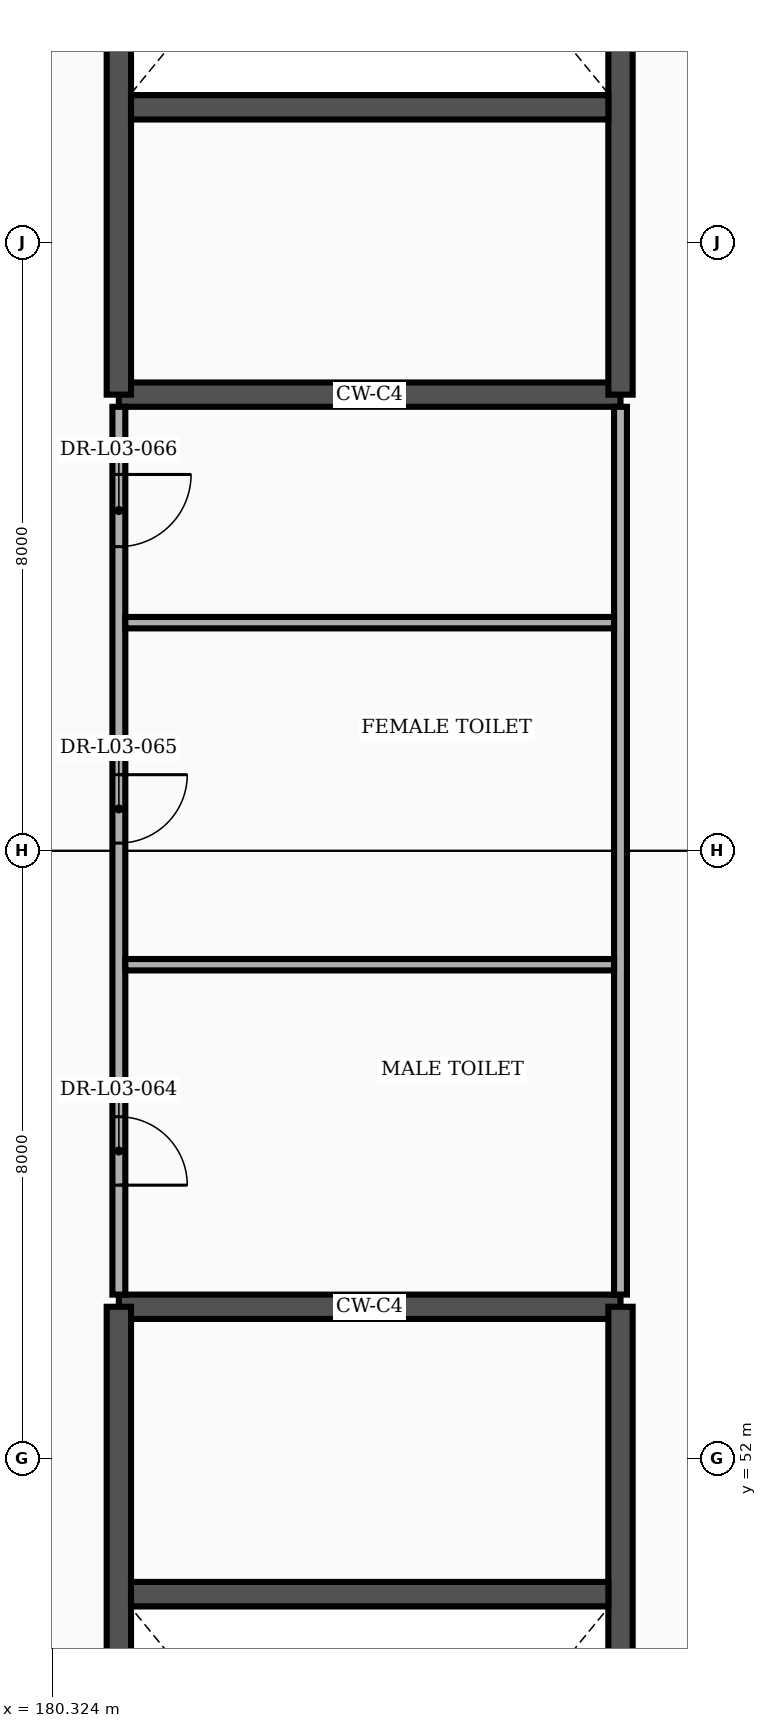
"""IFC4 building model, lengths in metres.
Left out: names, types, materials, properties, quantities, classifications, styles, units other than length and angle.
Written with IfcOpenShell. Run it as: python <this file> out.ifc"""

import sys

from ifc_helpers import new_model, si_unit, direction, frame, frame_2d, origin, place, context, subcontext, project, spatial, rectangle, extrude, element, fill, save


model = new_model("IFC4")
c1 = context("Model", 3, precision=1e-05, world=origin(), true_north=direction((0.0, 1.0)))
c2 = subcontext(c1, "Body", "Model", "MODEL_VIEW")
j1 = project(units=[si_unit("LENGTHUNIT", "METRE"), si_unit("PLANEANGLEUNIT", "RADIAN")], contexts=[c1])
p1 = place(None, origin())
s1 = spatial("IfcSite", under=j1, at=p1, CompositionType="ELEMENT")
p2 = place(p1, origin())
s2 = spatial("IfcBuilding", under=s1, at=p2, CompositionType="ELEMENT")
p3 = place(p2, frame((0.0, 0.0, 16.8)))
s3 = spatial("IfcBuildingStorey", under=s2, at=p3, CompositionType="ELEMENT", Elevation=16.8)
p4 = place(p3, frame((181.2, 54.0, 0.0), z_axis=(0.0, 0.0, 1.0), x_axis=(1.0, 0.0, 0.0)))
e1 = element("IfcWall", 1, at=p4, inside=s3, PredefinedType="SHEAR", context=c2, shape_type="SweptSolid", body=[
    extrude(rectangle(XDim=6.6, YDim=0.32, at=frame_2d((3.3, 0.0))), origin(), (0.0, 0.0, 1.0), 4.555),
])
p5 = place(p3, frame((181.2, 39.4, 0.0), z_axis=(0.0, 0.0, 1.0), x_axis=(0.0, 1.0, 0.0)))
e2 = element("IfcWall", 2, at=p5, inside=s3, PredefinedType="SHEAR", context=c2, shape_type="SweptSolid", body=[
    extrude(rectangle(XDim=14.6, YDim=0.32, at=frame_2d((7.3, 0.0))), origin(), (0.0, 0.0, 1.0), 4.555),
])
p6 = place(p5, frame((0.55, 0.0, 0.0)))
e3 = element("IfcOpeningElement", 3, at=p6, cuts=e2, PredefinedType="OPENING", context=c2, shape_type="SweptSolid", body=[
    extrude(rectangle(XDim=2.4, YDim=2.25, at=frame_2d((1.2, 1.125))), frame((0.0, 0.172, 0.0), z_axis=(0.0, -1.0, 0.0), x_axis=(1.0, 0.0, 0.0)), (0.0, 0.0, 1.0), 0.344),
])
p7 = place(p3, frame((187.8, 39.4, 0.0), z_axis=(0.0, 0.0, 1.0), x_axis=(0.0, 1.0, 0.0)))
e4 = element("IfcWall", 4, at=p7, inside=s3, PredefinedType="SHEAR", context=c2, shape_type="SweptSolid", body=[
    extrude(rectangle(XDim=14.6, YDim=0.32, at=frame_2d((7.3, 0.0))), origin(), (0.0, 0.0, 1.0), 4.555),
])
p8 = place(p3, frame((181.36, 50.22, 0.0), z_axis=(0.0, 0.0, 1.0), x_axis=(1.0, 0.0, 0.0)))
e5 = element("IfcWall", 5, at=p8, inside=s3, PredefinedType="SHEAR", context=c2, shape_type="SweptSolid", body=[
    extrude(rectangle(XDim=6.28, YDim=0.32, at=frame_2d((3.14, 0.0))), origin(), (0.0, 0.0, 1.0), 4.555),
])
p9 = place(p3, frame((181.2, 66.0, 0.0), z_axis=(0.0, 0.0, 1.0), x_axis=(1.0, 0.0, 0.0)))
e6 = element("IfcWall", 6, at=p9, inside=s3, PredefinedType="SHEAR", context=c2, shape_type="SweptSolid", body=[
    extrude(rectangle(XDim=6.6, YDim=0.32, at=frame_2d((3.3, 0.0))), origin(), (0.0, 0.0, 1.0), 4.555),
])
p10 = place(p3, frame((181.2, 66.0, 0.0), z_axis=(0.0, 0.0, 1.0), x_axis=(0.0, 1.0, 0.0)))
e7 = element("IfcWall", 7, at=p10, inside=s3, PredefinedType="SHEAR", context=c2, shape_type="SweptSolid", body=[
    extrude(rectangle(XDim=14.6, YDim=0.32, at=frame_2d((7.3, 0.0))), origin(), (0.0, 0.0, 1.0), 4.555),
])
p11 = place(p10, frame((11.65, 0.0, 0.0)))
e8 = element("IfcOpeningElement", 8, at=p11, cuts=e7, PredefinedType="OPENING", context=c2, shape_type="SweptSolid", body=[
    extrude(rectangle(XDim=2.4, YDim=2.25, at=frame_2d((1.2, 1.125))), frame((0.0, 0.172, 0.0), z_axis=(0.0, -1.0, 0.0), x_axis=(1.0, 0.0, 0.0)), (0.0, 0.0, 1.0), 0.344),
])
p12 = place(p3, frame((187.8, 66.0, 0.0), z_axis=(0.0, 0.0, 1.0), x_axis=(0.0, 1.0, 0.0)))
e9 = element("IfcWall", 9, at=p12, inside=s3, PredefinedType="SHEAR", context=c2, shape_type="SweptSolid", body=[
    extrude(rectangle(XDim=14.6, YDim=0.32, at=frame_2d((7.3, 0.0))), origin(), (0.0, 0.0, 1.0), 4.555),
])
p13 = place(p3, frame((181.36, 69.78, 0.0), z_axis=(0.0, 0.0, 1.0), x_axis=(1.0, 0.0, 0.0)))
e10 = element("IfcWall", 10, at=p13, inside=s3, PredefinedType="SHEAR", context=c2, shape_type="SweptSolid", body=[
    extrude(rectangle(XDim=6.28, YDim=0.32, at=frame_2d((3.14, 0.0))), origin(), (0.0, 0.0, 1.0), 4.555),
])
p14 = place(p3, frame((187.8, 54.16, 0.0), z_axis=(0.0, 0.0, 1.0), x_axis=(0.0, 1.0, 0.0)))
e11 = element("IfcWall", 11, at=p14, inside=s3, PredefinedType="PARTITIONING", context=c2, shape_type="SweptSolid", body=[
    extrude(rectangle(XDim=11.68, YDim=0.17, at=frame_2d((5.84, 0.0))), origin(), (0.0, 0.0, 1.0), 4.555),
])
p15 = place(p3, frame((181.2, 54.16, 0.0), z_axis=(0.0, 0.0, 1.0), x_axis=(0.0, 1.0, 0.0)))
e12 = element("IfcWall", 12, at=p15, inside=s3, PredefinedType="PARTITIONING", context=c2, shape_type="SweptSolid", body=[
    extrude(rectangle(XDim=11.68, YDim=0.17, at=frame_2d((5.84, 0.0))), origin(), (0.0, 0.0, 1.0), 4.555),
])
p16 = place(p15, frame((1.44, 0.0, 0.0)))
e13 = element("IfcOpeningElement", 13, at=p16, cuts=e12, PredefinedType="OPENING", context=c2, shape_type="SweptSolid", body=[
    extrude(rectangle(XDim=0.9, YDim=2.1, at=frame_2d((0.45, 1.05))), frame((0.0, 0.097, 0.0), z_axis=(0.0, -1.0, 0.0), x_axis=(1.0, 0.0, 0.0)), (0.0, 0.0, 1.0), 0.194),
])
p17 = place(p15, frame((5.94, 0.0, 0.0)))
e14 = element("IfcOpeningElement", 14, at=p17, cuts=e12, PredefinedType="OPENING", context=c2, shape_type="SweptSolid", body=[
    extrude(rectangle(XDim=0.9, YDim=2.1, at=frame_2d((0.45, 1.05))), frame((0.0, 0.097, 0.0), z_axis=(0.0, -1.0, 0.0), x_axis=(1.0, 0.0, 0.0)), (0.0, 0.0, 1.0), 0.194),
])
p18 = place(p15, frame((9.84, 0.0, 0.0)))
e15 = element("IfcOpeningElement", 15, at=p18, cuts=e12, PredefinedType="OPENING", context=c2, shape_type="SweptSolid", body=[
    extrude(rectangle(XDim=0.95, YDim=2.1, at=frame_2d((0.475, 1.05))), frame((0.0, 0.097, 0.0), z_axis=(0.0, -1.0, 0.0), x_axis=(1.0, 0.0, 0.0)), (0.0, 0.0, 1.0), 0.194),
])
for number, where, z_axis, x_axis in (
    (16, (181.285, 58.5, 0.0), (0.0, 0.0, 1.0), (1.0, 0.0, 0.0)),
    (17, (181.285, 63.0, 0.0), (0.0, 0.0, 1.0), (1.0, 0.0, 0.0)),
):
    element("IfcWall", number, at=place(p3, frame(where, z_axis=z_axis, x_axis=x_axis)), inside=s3, PredefinedType="PARTITIONING", context=c2, shape_type="SweptSolid", body=[
        extrude(rectangle(XDim=6.43, YDim=0.15, at=frame_2d((3.215, 0.0))), origin(), (0.0, 0.0, 1.0), 4.555),
    ])
p19 = place(p16, frame((0.9, 0.0, 0.0), z_axis=(0.0, 0.0, 1.0), x_axis=(-1.0, 0.0, 0.0)))
e18 = element("IfcDoor", 18, at=p19, inside=s3, OperationType="SINGLE_SWING_RIGHT", PredefinedType="DOOR", context=c2, shape_type="SweptSolid", body=[
    extrude(rectangle(XDim=0.9, YDim=2.1, at=frame_2d((0.45, 1.05))), frame((0.0, 0.025, 0.0), z_axis=(0.0, -1.0, 0.0), x_axis=(1.0, 0.0, 0.0)), (0.0, 0.0, 1.0), 0.05),
])
fill(e13, e18)
p20 = place(p17, frame((0.9, 0.0, 0.0), z_axis=(0.0, 0.0, 1.0), x_axis=(-1.0, 0.0, 0.0)))
e19 = element("IfcDoor", 19, at=p20, inside=s3, OperationType="SINGLE_SWING_LEFT", PredefinedType="DOOR", context=c2, shape_type="SweptSolid", body=[
    extrude(rectangle(XDim=0.9, YDim=2.1, at=frame_2d((0.45, 1.05))), frame((0.0, 0.025, 0.0), z_axis=(0.0, -1.0, 0.0), x_axis=(1.0, 0.0, 0.0)), (0.0, 0.0, 1.0), 0.05),
])
fill(e14, e19)
p21 = place(p18, frame((0.95, 0.0, 0.0), z_axis=(0.0, 0.0, 1.0), x_axis=(-1.0, 0.0, 0.0)))
e20 = element("IfcDoor", 20, at=p21, inside=s3, OperationType="SINGLE_SWING_LEFT", PredefinedType="DOOR", context=c2, shape_type="SweptSolid", body=[
    extrude(rectangle(XDim=0.95, YDim=2.1, at=frame_2d((0.475, 1.05))), frame((0.0, 0.025, 0.0), z_axis=(0.0, -1.0, 0.0), x_axis=(1.0, 0.0, 0.0)), (0.0, 0.0, 1.0), 0.05),
])
fill(e15, e20)
save(model, sys.argv[1])
